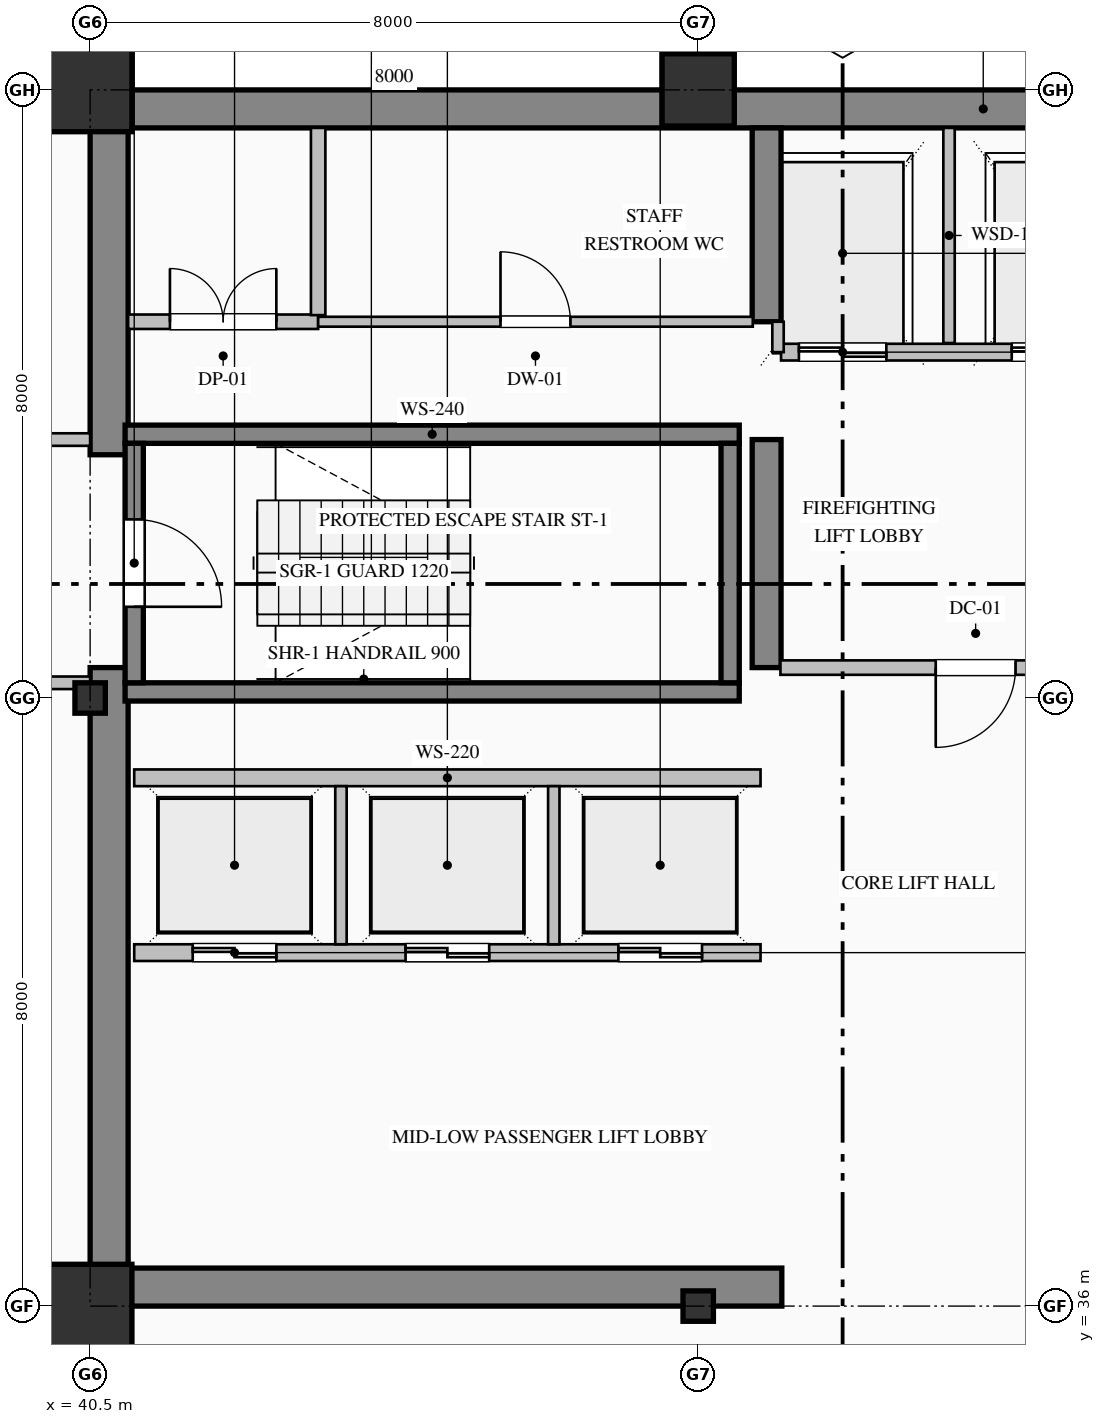
"""IFC4 building model, lengths in metres.
Left out: names, types, materials, properties, quantities, classifications, styles, units other than length and angle.
Written with IfcOpenShell. Run it as: python <this file> out.ifc"""

import sys

from ifc_helpers import new_model, si_unit, direction, frame, frame_2d, origin, origin_2d, place, context, subcontext, project, spatial, rectangle, hollow_rectangle, i_section, extrude, element, fill, save


model = new_model("IFC4")
c1 = context("Model", 3, precision=1e-05, world=origin(), true_north=direction((0.0, 1.0)))
c2 = subcontext(c1, "Body", "Model", "MODEL_VIEW")
j1 = project(units=[si_unit("LENGTHUNIT", "METRE"), si_unit("PLANEANGLEUNIT", "RADIAN")], contexts=[c1])
p1 = place(None, origin())
s1 = spatial("IfcSite", under=j1, at=p1, CompositionType="ELEMENT")
p2 = place(p1, origin())
s2 = spatial("IfcBuilding", under=s1, at=p2, CompositionType="ELEMENT")
p3 = place(p2, frame((0.0, 0.0, 131.0)))
s3 = spatial("IfcBuildingStorey", under=s2, at=p3, CompositionType="ELEMENT", Elevation=131.0)
p4 = place(p3, frame((40.5, 51.75, 0.0), z_axis=(0.0, 0.0, 1.0), x_axis=(1.0, 0.0, 0.0)))
e1 = element("IfcWall", 1, at=p4, inside=s3, PredefinedType="SHEAR", context=c2, shape_type="SweptSolid", body=[
    extrude(rectangle(XDim=23.5, YDim=0.5, at=frame_2d((11.75, 0.0))), origin(), (0.0, 0.0, 1.0), 3.765),
])
p5 = place(p3, frame((40.75, 36.5, 0.0), z_axis=(0.0, 0.0, 1.0), x_axis=(0.0, 1.0, 0.0)))
e2 = element("IfcWall", 2, at=p5, inside=s3, PredefinedType="SHEAR", context=c2, shape_type="SweptSolid", body=[
    extrude(rectangle(XDim=7.9, YDim=0.5, at=frame_2d((3.95, 0.0))), origin(), (0.0, 0.0, 1.0), 3.765),
])
p6 = place(p3, frame((40.75, 47.2, 0.0), z_axis=(0.0, 0.0, 1.0), x_axis=(0.0, 1.0, 0.0)))
e3 = element("IfcWall", 3, at=p6, inside=s3, PredefinedType="SHEAR", context=c2, shape_type="SweptSolid", body=[
    extrude(rectangle(XDim=4.3, YDim=0.5, at=frame_2d((2.15, 0.0))), origin(), (0.0, 0.0, 1.0), 3.765),
])
p7 = place(p3, frame((40.5, 36.25, 0.0), z_axis=(0.0, 0.0, 1.0), x_axis=(1.0, 0.0, 0.0)))
e4 = element("IfcWall", 4, at=p7, inside=s3, PredefinedType="SHEAR", context=c2, shape_type="SweptSolid", body=[
    extrude(rectangle(XDim=9.1, YDim=0.5, at=frame_2d((4.55, 0.0))), origin(), (0.0, 0.0, 1.0), 3.765),
])
p8 = place(p3, frame((49.4, 44.4, 0.0), z_axis=(0.0, 0.0, 1.0), x_axis=(0.0, 1.0, 0.0)))
e5 = element("IfcWall", 5, at=p8, inside=s3, PredefinedType="SHEAR", context=c2, shape_type="SweptSolid", body=[
    extrude(rectangle(XDim=3.0, YDim=0.38, at=frame_2d((1.5, 0.0))), origin(), (0.0, 0.0, 1.0), 3.765),
])
p9 = place(p3, frame((49.4, 48.95, 0.0), z_axis=(0.0, 0.0, 1.0), x_axis=(0.0, 1.0, 0.0)))
e6 = element("IfcWall", 6, at=p9, inside=s3, PredefinedType="SHEAR", context=c2, shape_type="SweptSolid", body=[
    extrude(rectangle(XDim=2.55, YDim=0.38, at=frame_2d((1.275, 0.0))), origin(), (0.0, 0.0, 1.0), 3.765),
])
p10 = place(p3, frame((40.5, 36.0, 0.0), z_axis=(0.0, 0.0, 1.0), x_axis=(1.0, 0.0, 0.0)))
e7 = element("IfcColumn", 7, at=p10, inside=s3, PredefinedType="COLUMN", context=c2, shape_type="SweptSolid", body=[
    extrude(hollow_rectangle(XDim=1.1, YDim=1.1, WallThickness=0.04, at=origin_2d()), origin(), (0.0, 0.0, 1.0), 4.0),
])
p11 = place(p3, frame((40.5, 44.0, 0.0), z_axis=(0.0, 0.0, 1.0), x_axis=(1.0, 0.0, 0.0)))
e8 = element("IfcColumn", 8, at=p11, inside=s3, PredefinedType="COLUMN", context=c2, shape_type="SweptSolid", body=[
    extrude(i_section(OverallWidth=0.4, OverallDepth=0.4, WebThickness=0.013, FlangeThickness=0.021, FilletRadius=0.022, at=origin_2d()), origin(), (0.0, 0.0, 1.0), 4.0),
])
p12 = place(p3, frame((40.5, 52.0, 0.0), z_axis=(0.0, 0.0, 1.0), x_axis=(1.0, 0.0, 0.0)))
e9 = element("IfcColumn", 9, at=p12, inside=s3, PredefinedType="COLUMN", context=c2, shape_type="SweptSolid", body=[
    extrude(hollow_rectangle(XDim=1.1, YDim=1.1, WallThickness=0.04, at=origin_2d()), origin(), (0.0, 0.0, 1.0), 4.0),
])
p13 = place(p3, frame((48.5, 36.0, 0.0), z_axis=(0.0, 0.0, 1.0), x_axis=(1.0, 0.0, 0.0)))
e10 = element("IfcColumn", 10, at=p13, inside=s3, PredefinedType="COLUMN", context=c2, shape_type="SweptSolid", body=[
    extrude(i_section(OverallWidth=0.4, OverallDepth=0.4, WebThickness=0.013, FlangeThickness=0.021, FilletRadius=0.022, at=origin_2d()), origin(), (0.0, 0.0, 1.0), 4.0),
])
p14 = place(p3, frame((48.5, 52.0, 0.0), z_axis=(0.0, 0.0, 1.0), x_axis=(1.0, 0.0, 0.0)))
e11 = element("IfcColumn", 11, at=p14, inside=s3, PredefinedType="COLUMN", context=c2, shape_type="SweptSolid", body=[
    extrude(hollow_rectangle(XDim=0.95, YDim=0.95, WallThickness=0.036, at=origin_2d()), origin(), (0.0, 0.0, 1.0), 4.0),
])
p15 = place(p3, frame((13.0, 51.83, 0.0), z_axis=(0.0, 0.0, 1.0), x_axis=(1.0, 0.0, 0.0)))
e12 = element("IfcWall", 12, at=p15, inside=s3, PredefinedType="SOLIDWALL", context=c2, shape_type="SweptSolid", body=[
    extrude(rectangle(XDim=27.52, YDim=0.34, at=frame_2d((13.76, 0.0))), origin(), (0.0, 0.0, 1.0), 3.265),
])
p16 = place(p15, frame((6.375, 0.0, 0.85)))
e13 = element("IfcOpeningElement", 13, at=p16, cuts=e12, PredefinedType="OPENING", context=c2, shape_type="SweptSolid", body=[
    extrude(rectangle(XDim=1.65, YDim=1.95, at=frame_2d((0.825, 0.975))), frame((0.0, 0.18, 0.0), z_axis=(0.0, -1.0, 0.0), x_axis=(1.0, 0.0, 0.0)), (0.0, 0.0, 1.0), 0.36),
])
p17 = place(p15, frame((13.65, 0.0, 0.85)))
e14 = element("IfcOpeningElement", 14, at=p17, cuts=e12, PredefinedType="OPENING", context=c2, shape_type="SweptSolid", body=[
    extrude(rectangle(XDim=1.5, YDim=1.95, at=frame_2d((0.75, 0.975))), frame((0.0, 0.18, 0.0), z_axis=(0.0, -1.0, 0.0), x_axis=(1.0, 0.0, 0.0)), (0.0, 0.0, 1.0), 0.36),
])
for number, where, z_axis, x_axis in (
    (15, (40.96, 47.47, 0.0), (0.0, 0.0, 1.0), (1.0, 0.0, 0.0)),
    (16, (49.04, 44.08, 0.0), (0.0, 0.0, 1.0), (-1.0, 0.0, 0.0)),
):
    element("IfcWall", number, at=place(p3, frame(where, z_axis=z_axis, x_axis=x_axis)), inside=s3, PredefinedType="SOLIDWALL", context=c2, shape_type="SweptSolid", body=[
        extrude(rectangle(XDim=8.08, YDim=0.24, at=frame_2d((4.04, 0.0))), origin(), (0.0, 0.0, 1.0), 4.0),
    ])
p18 = place(p3, frame((41.08, 47.35, 0.0), z_axis=(0.0, 0.0, 1.0), x_axis=(0.0, -1.0, 0.0)))
e17 = element("IfcWall", 17, at=p18, inside=s3, PredefinedType="SOLIDWALL", context=c2, shape_type="SweptSolid", body=[
    extrude(rectangle(XDim=3.15, YDim=0.24, at=frame_2d((1.575, 0.0))), origin(), (0.0, 0.0, 1.0), 4.0),
])
p19 = place(p18, frame((1.0, 0.0, 0.0)))
e18 = element("IfcOpeningElement", 18, at=p19, cuts=e17, PredefinedType="OPENING", context=c2, shape_type="SweptSolid", body=[
    extrude(rectangle(XDim=1.15, YDim=2.2, at=frame_2d((0.575, 1.1))), frame((0.0, 0.13, 0.0), z_axis=(0.0, -1.0, 0.0), x_axis=(1.0, 0.0, 0.0)), (0.0, 0.0, 1.0), 0.26),
])
p20 = place(p3, frame((48.92, 44.2, 0.0), z_axis=(0.0, 0.0, 1.0), x_axis=(0.0, 1.0, 0.0)))
e19 = element("IfcWall", 19, at=p20, inside=s3, PredefinedType="SOLIDWALL", context=c2, shape_type="SweptSolid", body=[
    extrude(rectangle(XDim=3.15, YDim=0.24, at=frame_2d((1.575, 0.0))), origin(), (0.0, 0.0, 1.0), 4.0),
])
p21 = place(p3, frame((54.71, 48.55, 0.0), z_axis=(0.0, 0.0, 1.0), x_axis=(-1.0, 0.0, 0.0)))
e20 = element("IfcWall", 20, at=p21, inside=s3, PredefinedType="PARTITIONING", context=c2, shape_type="SweptSolid", body=[
    extrude(rectangle(XDim=5.12, YDim=0.22, at=frame_2d((2.56, 0.0))), origin(), (0.0, 0.0, 1.0), 3.765),
])
p22 = place(p21, frame((3.735, 0.0, 0.0)))
e21 = element("IfcOpeningElement", 21, at=p22, cuts=e20, PredefinedType="OPENING", context=c2, shape_type="SweptSolid", body=[
    extrude(rectangle(XDim=1.15, YDim=2.2, at=frame_2d((0.575, 1.1))), frame((0.0, 0.12, 0.0), z_axis=(0.0, -1.0, 0.0), x_axis=(1.0, 0.0, 0.0)), (0.0, 0.0, 1.0), 0.24),
])
p23 = place(p21, frame((0.935, 0.0, 0.0)))
e22 = element("IfcOpeningElement", 22, at=p23, cuts=e20, PredefinedType="OPENING", context=c2, shape_type="SweptSolid", body=[
    extrude(rectangle(XDim=1.15, YDim=2.2, at=frame_2d((0.575, 1.1))), frame((0.0, 0.12, 0.0), z_axis=(0.0, -1.0, 0.0), x_axis=(1.0, 0.0, 0.0)), (0.0, 0.0, 1.0), 0.24),
])
p24 = place(p3, frame((51.8, 48.67, 0.0), z_axis=(0.0, 0.0, 1.0), x_axis=(0.0, 1.0, 0.0)))
e23 = element("IfcWall", 23, at=p24, inside=s3, PredefinedType="PARTITIONING", context=c2, shape_type="SweptSolid", body=[
    extrude(rectangle(XDim=2.83, YDim=0.15, at=frame_2d((1.415, 0.0))), origin(), (0.0, 0.0, 1.0), 3.765),
])
p25 = place(p3, frame((49.55, 48.55, 0.0), z_axis=(0.0, 0.0, 1.0), x_axis=(0.0, 1.0, 0.0)))
e24 = element("IfcWall", 24, at=p25, inside=s3, PredefinedType="PARTITIONING", context=c2, shape_type="SweptSolid", body=[
    extrude(rectangle(XDim=0.4, YDim=0.15, at=frame_2d((0.2, 0.0))), origin(), (0.0, 0.0, 1.0), 3.765),
])
p26 = place(p3, frame((49.32, 40.65, 0.0), z_axis=(0.0, 0.0, 1.0), x_axis=(-1.0, 0.0, 0.0)))
e25 = element("IfcWall", 25, at=p26, inside=s3, PredefinedType="PARTITIONING", context=c2, shape_type="SweptSolid", body=[
    extrude(rectangle(XDim=8.24, YDim=0.22, at=frame_2d((4.12, 0.0))), origin(), (0.0, 0.0, 1.0), 3.765),
])
p27 = place(p26, frame((6.37, 0.0, 0.0)))
e26 = element("IfcOpeningElement", 26, at=p27, cuts=e25, PredefinedType="OPENING", context=c2, shape_type="SweptSolid", body=[
    extrude(rectangle(XDim=1.1, YDim=2.2, at=frame_2d((0.55, 1.1))), frame((0.0, 0.12, 0.0), z_axis=(0.0, -1.0, 0.0), x_axis=(1.0, 0.0, 0.0)), (0.0, 0.0, 1.0), 0.24),
])
p28 = place(p26, frame((3.57, 0.0, 0.0)))
e27 = element("IfcOpeningElement", 27, at=p28, cuts=e25, PredefinedType="OPENING", context=c2, shape_type="SweptSolid", body=[
    extrude(rectangle(XDim=1.1, YDim=2.2, at=frame_2d((0.55, 1.1))), frame((0.0, 0.12, 0.0), z_axis=(0.0, -1.0, 0.0), x_axis=(1.0, 0.0, 0.0)), (0.0, 0.0, 1.0), 0.24),
])
p29 = place(p26, frame((0.77, 0.0, 0.0)))
e28 = element("IfcOpeningElement", 28, at=p29, cuts=e25, PredefinedType="OPENING", context=c2, shape_type="SweptSolid", body=[
    extrude(rectangle(XDim=1.1, YDim=2.2, at=frame_2d((0.55, 1.1))), frame((0.0, 0.12, 0.0), z_axis=(0.0, -1.0, 0.0), x_axis=(1.0, 0.0, 0.0)), (0.0, 0.0, 1.0), 0.24),
])
p30 = place(p3, frame((41.08, 42.95, 0.0), z_axis=(0.0, 0.0, 1.0), x_axis=(1.0, 0.0, 0.0)))
e29 = element("IfcWall", 29, at=p30, inside=s3, PredefinedType="PARTITIONING", context=c2, shape_type="SweptSolid", body=[
    extrude(rectangle(XDim=8.24, YDim=0.22, at=frame_2d((4.12, 0.0))), origin(), (0.0, 0.0, 1.0), 3.765),
])
for number, where, z_axis, x_axis in (
    (30, (43.8, 40.76, 0.0), (0.0, 0.0, 1.0), (0.0, 1.0, 0.0)),
    (31, (46.6, 40.76, 0.0), (0.0, 0.0, 1.0), (0.0, 1.0, 0.0)),
):
    element("IfcWall", number, at=place(p3, frame(where, z_axis=z_axis, x_axis=x_axis)), inside=s3, PredefinedType="PARTITIONING", context=c2, shape_type="SweptSolid", body=[
        extrude(rectangle(XDim=2.08, YDim=0.15, at=frame_2d((1.04, 0.0))), origin(), (0.0, 0.0, 1.0), 3.765),
    ])
p31 = place(p3, frame((37.8, 47.4, 0.0), z_axis=(0.0, 0.0, 1.0), x_axis=(1.0, 0.0, 0.0)))
e32 = element("IfcWall", 32, at=p31, inside=s3, PredefinedType="PARTITIONING", context=c2, shape_type="SweptSolid", body=[
    extrude(rectangle(XDim=2.7, YDim=0.165, at=frame_2d((1.35, 0.0))), origin(), (0.0, 0.0, 1.0), 3.765),
])
p32 = place(p31, frame((0.825, 0.0, 0.0)))
e33 = element("IfcOpeningElement", 33, at=p32, cuts=e32, PredefinedType="OPENING", context=c2, shape_type="SweptSolid", body=[
    extrude(rectangle(XDim=1.05, YDim=2.15, at=frame_2d((0.525, 1.075))), frame((0.0, 0.093, 0.0), z_axis=(0.0, -1.0, 0.0), x_axis=(1.0, 0.0, 0.0)), (0.0, 0.0, 1.0), 0.185),
])
p33 = place(p3, frame((40.5, 44.2, 0.0), z_axis=(0.0, 0.0, 1.0), x_axis=(-1.0, 0.0, 0.0)))
e34 = element("IfcWall", 34, at=p33, inside=s3, PredefinedType="PARTITIONING", context=c2, shape_type="SweptSolid", body=[
    extrude(rectangle(XDim=2.7, YDim=0.165, at=frame_2d((1.35, 0.0))), origin(), (0.0, 0.0, 1.0), 3.765),
])
p34 = place(p33, frame((0.825, 0.0, 0.0)))
e35 = element("IfcOpeningElement", 35, at=p34, cuts=e34, PredefinedType="OPENING", context=c2, shape_type="SweptSolid", body=[
    extrude(rectangle(XDim=1.05, YDim=2.15, at=frame_2d((0.525, 1.075))), frame((0.0, 0.093, 0.0), z_axis=(0.0, -1.0, 0.0), x_axis=(1.0, 0.0, 0.0)), (0.0, 0.0, 1.0), 0.185),
])
p35 = place(p3, frame((41.0, 48.95, 0.0), z_axis=(0.0, 0.0, 1.0), x_axis=(1.0, 0.0, 0.0)))
e36 = element("IfcWall", 36, at=p35, inside=s3, PredefinedType="PARTITIONING", context=c2, shape_type="SweptSolid", body=[
    extrude(rectangle(XDim=2.5, YDim=0.19, at=frame_2d((1.25, 0.0))), origin(), (0.0, 0.0, 1.0), 3.765),
])
p36 = place(p35, frame((0.55, 0.0, 0.0)))
e37 = element("IfcOpeningElement", 37, at=p36, cuts=e36, PredefinedType="OPENING", context=c2, shape_type="SweptSolid", body=[
    extrude(rectangle(XDim=1.4, YDim=2.25, at=frame_2d((0.7, 1.125))), frame((0.0, 0.105, 0.0), z_axis=(0.0, -1.0, 0.0), x_axis=(1.0, 0.0, 0.0)), (0.0, 0.0, 1.0), 0.21),
])
p37 = place(p3, frame((43.5, 48.95, 0.0), z_axis=(0.0, 0.0, 1.0), x_axis=(1.0, 0.0, 0.0)))
e38 = element("IfcWall", 38, at=p37, inside=s3, PredefinedType="PARTITIONING", context=c2, shape_type="SweptSolid", body=[
    extrude(rectangle(XDim=5.718, YDim=0.13, at=frame_2d((2.859, 0.0))), origin(), (0.0, 0.0, 1.0), 3.765),
])
p38 = place(p37, frame((2.399, 0.0, 0.0)))
e39 = element("IfcOpeningElement", 39, at=p38, cuts=e38, PredefinedType="OPENING", context=c2, shape_type="SweptSolid", body=[
    extrude(rectangle(XDim=0.92, YDim=2.15, at=frame_2d((0.46, 1.075))), frame((0.0, 0.075, 0.0), z_axis=(0.0, -1.0, 0.0), x_axis=(1.0, 0.0, 0.0)), (0.0, 0.0, 1.0), 0.15),
])
p39 = place(p3, frame((54.718, 44.4, 0.0), z_axis=(0.0, 0.0, 1.0), x_axis=(-1.0, 0.0, 0.0)))
e40 = element("IfcWall", 40, at=p39, inside=s3, PredefinedType="PARTITIONING", context=c2, shape_type="SweptSolid", body=[
    extrude(rectangle(XDim=5.136, YDim=0.19, at=frame_2d((2.568, 0.0))), origin(), (0.0, 0.0, 1.0), 3.765),
])
p40 = place(p39, frame((2.043, 0.0, 0.0)))
e41 = element("IfcOpeningElement", 41, at=p40, cuts=e40, PredefinedType="OPENING", context=c2, shape_type="SweptSolid", body=[
    extrude(rectangle(XDim=1.05, YDim=2.15, at=frame_2d((0.525, 1.075))), frame((0.0, 0.105, 0.0), z_axis=(0.0, -1.0, 0.0), x_axis=(1.0, 0.0, 0.0)), (0.0, 0.0, 1.0), 0.21),
])
p41 = place(p3, frame((43.5, 51.5, 0.0), z_axis=(0.0, 0.0, 1.0), x_axis=(0.0, -1.0, 0.0)))
e42 = element("IfcWall", 42, at=p41, inside=s3, PredefinedType="PARTITIONING", context=c2, shape_type="SweptSolid", body=[
    extrude(rectangle(XDim=2.463, YDim=0.19, at=frame_2d((1.231, 0.0))), origin(), (0.0, 0.0, 1.0), 3.765),
])
p42 = place(p19, origin())
e43 = element("IfcDoor", 43, at=p42, inside=s3, OperationType="SINGLE_SWING_RIGHT", PredefinedType="DOOR", context=c2, shape_type="SweptSolid", body=[
    extrude(rectangle(XDim=1.15, YDim=2.2, at=frame_2d((0.575, 1.1))), frame((0.0, 0.025, 0.0), z_axis=(0.0, -1.0, 0.0), x_axis=(1.0, 0.0, 0.0)), (0.0, 0.0, 1.0), 0.05),
])
fill(e18, e43)
p43 = place(p22, origin())
e44 = element("IfcDoor", 44, at=p43, inside=s3, OperationType="DOUBLE_DOOR_SLIDING", PredefinedType="DOOR", context=c2, shape_type="SweptSolid", body=[
    extrude(rectangle(XDim=1.15, YDim=2.2, at=frame_2d((0.575, 1.1))), frame((0.0, 0.025, 0.0), z_axis=(0.0, -1.0, 0.0), x_axis=(1.0, 0.0, 0.0)), (0.0, 0.0, 1.0), 0.05),
])
fill(e21, e44)
p44 = place(p23, origin())
e45 = element("IfcDoor", 45, at=p44, inside=s3, OperationType="DOUBLE_DOOR_SLIDING", PredefinedType="DOOR", context=c2, shape_type="SweptSolid", body=[
    extrude(rectangle(XDim=1.15, YDim=2.2, at=frame_2d((0.575, 1.1))), frame((0.0, 0.025, 0.0), z_axis=(0.0, -1.0, 0.0), x_axis=(1.0, 0.0, 0.0)), (0.0, 0.0, 1.0), 0.05),
])
fill(e22, e45)
p45 = place(p27, origin())
e46 = element("IfcDoor", 46, at=p45, inside=s3, OperationType="DOUBLE_DOOR_SLIDING", PredefinedType="DOOR", context=c2, shape_type="SweptSolid", body=[
    extrude(rectangle(XDim=1.1, YDim=2.2, at=frame_2d((0.55, 1.1))), frame((0.0, 0.025, 0.0), z_axis=(0.0, -1.0, 0.0), x_axis=(1.0, 0.0, 0.0)), (0.0, 0.0, 1.0), 0.05),
])
fill(e26, e46)
p46 = place(p28, origin())
e47 = element("IfcDoor", 47, at=p46, inside=s3, OperationType="DOUBLE_DOOR_SLIDING", PredefinedType="DOOR", context=c2, shape_type="SweptSolid", body=[
    extrude(rectangle(XDim=1.1, YDim=2.2, at=frame_2d((0.55, 1.1))), frame((0.0, 0.025, 0.0), z_axis=(0.0, -1.0, 0.0), x_axis=(1.0, 0.0, 0.0)), (0.0, 0.0, 1.0), 0.05),
])
fill(e27, e47)
p47 = place(p29, origin())
e48 = element("IfcDoor", 48, at=p47, inside=s3, OperationType="DOUBLE_DOOR_SLIDING", PredefinedType="DOOR", context=c2, shape_type="SweptSolid", body=[
    extrude(rectangle(XDim=1.1, YDim=2.2, at=frame_2d((0.55, 1.1))), frame((0.0, 0.025, 0.0), z_axis=(0.0, -1.0, 0.0), x_axis=(1.0, 0.0, 0.0)), (0.0, 0.0, 1.0), 0.05),
])
fill(e28, e48)
p48 = place(p40, origin())
e49 = element("IfcDoor", 49, at=p48, inside=s3, OperationType="SINGLE_SWING_RIGHT", PredefinedType="DOOR", context=c2, shape_type="SweptSolid", body=[
    extrude(rectangle(XDim=1.05, YDim=2.15, at=frame_2d((0.525, 1.075))), frame((0.0, 0.025, 0.0), z_axis=(0.0, -1.0, 0.0), x_axis=(1.0, 0.0, 0.0)), (0.0, 0.0, 1.0), 0.05),
])
fill(e41, e49)
p49 = place(p36, origin())
e50 = element("IfcDoor", 50, at=p49, inside=s3, OperationType="DOUBLE_DOOR_SINGLE_SWING", PredefinedType="DOOR", context=c2, shape_type="SweptSolid", body=[
    extrude(rectangle(XDim=1.4, YDim=2.25, at=frame_2d((0.7, 1.125))), frame((0.0, 0.025, 0.0), z_axis=(0.0, -1.0, 0.0), x_axis=(1.0, 0.0, 0.0)), (0.0, 0.0, 1.0), 0.05),
])
fill(e37, e50)
p50 = place(p38, origin())
e51 = element("IfcDoor", 51, at=p50, inside=s3, OperationType="SINGLE_SWING_LEFT", PredefinedType="DOOR", context=c2, shape_type="SweptSolid", body=[
    extrude(rectangle(XDim=0.92, YDim=2.15, at=frame_2d((0.46, 1.075))), frame((0.0, 0.025, 0.0), z_axis=(0.0, -1.0, 0.0), x_axis=(1.0, 0.0, 0.0)), (0.0, 0.0, 1.0), 0.05),
])
fill(e39, e51)
save(model, sys.argv[1])
